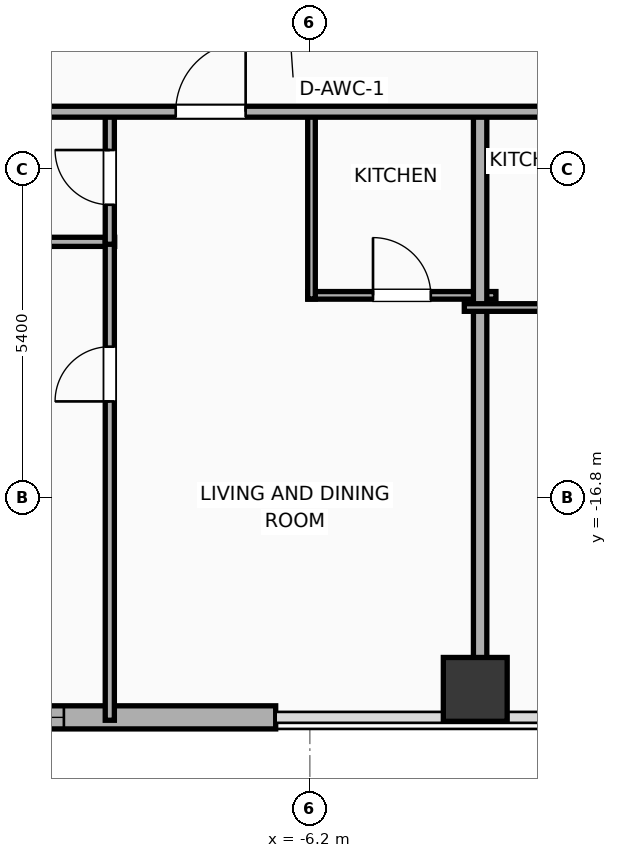
"""IFC4 building model, lengths in metres.
Left out: names, types, materials, properties, quantities, classifications, styles, units other than length and angle.
Written with IfcOpenShell. Run it as: python <this file> out.ifc"""

import sys

from ifc_helpers import new_model, si_unit, direction, frame, frame_2d, origin, origin_2d, place, context, subcontext, project, spatial, rectangle, hollow_rectangle, extrude, element, fill, save


model = new_model("IFC4")
c1 = context("Model", 3, precision=1e-05, world=origin(), true_north=direction((0.0, 1.0)))
c2 = subcontext(c1, "Body", "Model", "MODEL_VIEW")
j1 = project(units=[si_unit("LENGTHUNIT", "METRE"), si_unit("PLANEANGLEUNIT", "RADIAN")], contexts=[c1])
p1 = place(None, origin())
s1 = spatial("IfcSite", under=j1, at=p1, CompositionType="ELEMENT")
p2 = place(p1, origin())
s2 = spatial("IfcBuilding", under=s1, at=p2, CompositionType="ELEMENT")
p3 = place(p2, frame((0.0, 0.0, 117.0)))
s3 = spatial("IfcBuildingStorey", under=s2, at=p3, CompositionType="ELEMENT", Elevation=117.0)
p4 = place(p3, frame((-3.48, -19.95, 0.0), z_axis=(0.0, 0.0, 1.0), x_axis=(1.0, 0.0, 0.0)))
e1 = element("IfcColumn", 1, at=p4, inside=s3, PredefinedType="COLUMN", context=c2, shape_type="SweptSolid", body=[
    extrude(hollow_rectangle(XDim=1.05, YDim=1.05, WallThickness=0.036, at=origin_2d()), origin(), (0.0, 0.0, 1.0), 3.9),
])
p5 = place(p3, frame((-6.762, -20.41, 0.0), z_axis=(0.0, 0.0, 1.0), x_axis=(-1.0, 0.0, 0.0)))
e2 = element("IfcWall", 2, at=p5, inside=s3, PredefinedType="ELEMENTEDWALL", context=c2, shape_type="SweptSolid", body=[
    extrude(rectangle(XDim=18.619, YDim=0.38, at=frame_2d((9.31, 0.0))), origin(), (0.0, 0.0, 1.0), 3.65),
])
p6 = place(p5, frame((9.76, 0.0, 0.75)))
e3 = element("IfcOpeningElement", 3, at=p6, cuts=e2, PredefinedType="OPENING", context=c2, shape_type="SweptSolid", body=[
    extrude(rectangle(XDim=2.4, YDim=2.1, at=frame_2d((1.2, 1.05))), frame((0.0, 0.2, 0.0), z_axis=(0.0, -1.0, 0.0), x_axis=(1.0, 0.0, 0.0)), (0.0, 0.0, 1.0), 0.4),
])
p7 = place(p5, frame((15.384, 0.0, 0.75)))
e4 = element("IfcOpeningElement", 4, at=p7, cuts=e2, PredefinedType="OPENING", context=c2, shape_type="SweptSolid", body=[
    extrude(rectangle(XDim=1.2, YDim=2.05, at=frame_2d((0.6, 1.025))), frame((0.0, 0.2, 0.0), z_axis=(0.0, -1.0, 0.0), x_axis=(1.0, 0.0, 0.0)), (0.0, 0.0, 1.0), 0.4),
])
p8 = place(p5, frame((5.703, 0.0, 0.75)))
e5 = element("IfcOpeningElement", 5, at=p8, cuts=e2, PredefinedType="OPENING", context=c2, shape_type="SweptSolid", body=[
    extrude(rectangle(XDim=1.2, YDim=2.05, at=frame_2d((0.6, 1.025))), frame((0.0, 0.2, 0.0), z_axis=(0.0, -1.0, 0.0), x_axis=(1.0, 0.0, 0.0)), (0.0, 0.0, 1.0), 0.4),
])
p9 = place(p5, frame((3.483, 0.0, 0.75)))
e6 = element("IfcOpeningElement", 6, at=p9, cuts=e2, PredefinedType="OPENING", context=c2, shape_type="SweptSolid", body=[
    extrude(rectangle(XDim=1.2, YDim=2.05, at=frame_2d((0.6, 1.025))), frame((0.0, 0.2, 0.0), z_axis=(0.0, -1.0, 0.0), x_axis=(1.0, 0.0, 0.0)), (0.0, 0.0, 1.0), 0.4),
])
p10 = place(p3, frame((-12.46, -12.59, 0.0), z_axis=(0.0, 0.0, 1.0), x_axis=(1.0, 0.0, 0.0)))
e7 = element("IfcWall", 7, at=p10, inside=s3, PredefinedType="PLUMBINGWALL", context=c2, shape_type="SweptSolid", body=[
    extrude(rectangle(XDim=3.05, YDim=0.15, at=frame_2d((1.525, 0.0))), origin(), (0.0, 0.0, 1.0), 3.65),
])
p11 = place(p3, frame((-9.49, -20.458, 0.0), z_axis=(0.0, 0.0, 1.0), x_axis=(0.0, 1.0, 0.0)))
e8 = element("IfcWall", 8, at=p11, inside=s3, PredefinedType="PLUMBINGWALL", context=c2, shape_type="SweptSolid", body=[
    extrude(rectangle(XDim=7.907, YDim=0.15, at=frame_2d((3.954, 0.0))), origin(), (0.0, 0.0, 1.0), 3.65),
])
p12 = place(p11, frame((5.243, 0.0, 0.0)))
e9 = element("IfcOpeningElement", 9, at=p12, cuts=e8, PredefinedType="OPENING", context=c2, shape_type="SweptSolid", body=[
    extrude(rectangle(XDim=0.9, YDim=2.05, at=frame_2d((0.45, 1.025))), frame((0.0, 0.085, 0.0), z_axis=(0.0, -1.0, 0.0), x_axis=(1.0, 0.0, 0.0)), (0.0, 0.0, 1.0), 0.17),
])
p13 = place(p3, frame((-9.49, -12.63, 0.0), z_axis=(0.0, 0.0, 1.0), x_axis=(0.0, 1.0, 0.0)))
e10 = element("IfcWall", 10, at=p13, inside=s3, PredefinedType="PLUMBINGWALL", context=c2, shape_type="SweptSolid", body=[
    extrude(rectangle(XDim=2.2, YDim=0.15, at=frame_2d((1.1, 0.0))), origin(), (0.0, 0.0, 1.0), 3.65),
])
p14 = place(p13, frame((0.65, 0.0, 0.0)))
e11 = element("IfcOpeningElement", 11, at=p14, cuts=e10, PredefinedType="OPENING", context=c2, shape_type="SweptSolid", body=[
    extrude(rectangle(XDim=0.9, YDim=2.05, at=frame_2d((0.45, 1.025))), frame((0.0, 0.085, 0.0), z_axis=(0.0, -1.0, 0.0), x_axis=(1.0, 0.0, 0.0)), (0.0, 0.0, 1.0), 0.17),
])
p15 = place(p3, frame((-6.233, -13.47, 0.0), z_axis=(0.0, 0.0, 1.0), x_axis=(1.0, 0.0, 0.0)))
e12 = element("IfcWall", 12, at=p15, inside=s3, PredefinedType="PARTITIONING", context=c2, shape_type="SweptSolid", body=[
    extrude(rectangle(XDim=3.093, YDim=0.125, at=frame_2d((1.546, 0.0))), origin(), (0.0, 0.0, 1.0), 3.65),
])
p16 = place(p15, frame((1.072, 0.0, 0.0)))
e13 = element("IfcOpeningElement", 13, at=p16, cuts=e12, PredefinedType="OPENING", context=c2, shape_type="SweptSolid", body=[
    extrude(rectangle(XDim=0.95, YDim=2.05, at=frame_2d((0.475, 1.025))), frame((0.0, 0.073, 0.0), z_axis=(0.0, -1.0, 0.0), x_axis=(1.0, 0.0, 0.0)), (0.0, 0.0, 1.0), 0.145),
])
p17 = place(p3, frame((-6.173, -13.53, 0.0), z_axis=(0.0, 0.0, 1.0), x_axis=(0.0, 1.0, 0.0)))
e14 = element("IfcWall", 14, at=p17, inside=s3, PredefinedType="PARTITIONING", context=c2, shape_type="SweptSolid", body=[
    extrude(rectangle(XDim=3.1, YDim=0.125, at=frame_2d((1.55, 0.0))), origin(), (0.0, 0.0, 1.0), 3.65),
])
p18 = place(p3, frame((-3.4, -20.41, 0.0), z_axis=(0.0, 0.0, 1.0), x_axis=(0.0, 1.0, 0.0)))
e15 = element("IfcWall", 15, at=p18, inside=s3, PredefinedType="PARTITIONING", context=c2, shape_type="SweptSolid", body=[
    extrude(rectangle(XDim=10.04, YDim=0.22, at=frame_2d((5.02, 0.0))), origin(), (0.0, 0.0, 1.0), 3.04),
])
p19 = place(p3, frame((-3.66, -13.67, 0.0), z_axis=(0.0, 0.0, 1.0), x_axis=(1.0, 0.0, 0.0)))
e16 = element("IfcWall", 16, at=p19, inside=s3, PredefinedType="PARTITIONING", context=c2, shape_type="SweptSolid", body=[
    extrude(rectangle(XDim=2.784, YDim=0.125, at=frame_2d((1.392, 0.0))), origin(), (0.0, 0.0, 1.0), 3.65),
])
p20 = place(p3, frame((-29.21, -10.45, 0.0), z_axis=(0.0, 0.0, 1.0), x_axis=(1.0, 0.0, 0.0)))
e17 = element("IfcWall", 17, at=p20, inside=s3, PredefinedType="PARTITIONING", context=c2, shape_type="SweptSolid", body=[
    extrude(rectangle(XDim=62.42, YDim=0.18, at=frame_2d((31.21, 0.0))), origin(), (0.0, 0.0, 1.0), 3.65),
])
p21 = place(p20, frame((3.813, 0.0, 0.0)))
e18 = element("IfcOpeningElement", 18, at=p21, cuts=e17, PredefinedType="OPENING", context=c2, shape_type="SweptSolid", body=[
    extrude(rectangle(XDim=1.15, YDim=2.05, at=frame_2d((0.575, 1.025))), frame((0.0, 0.1, 0.0), z_axis=(0.0, -1.0, 0.0), x_axis=(1.0, 0.0, 0.0)), (0.0, 0.0, 1.0), 0.2),
])
p22 = place(p20, frame((12.271, 0.0, 0.0)))
e19 = element("IfcOpeningElement", 19, at=p22, cuts=e17, PredefinedType="OPENING", context=c2, shape_type="SweptSolid", body=[
    extrude(rectangle(XDim=1.15, YDim=2.05, at=frame_2d((0.575, 1.025))), frame((0.0, 0.1, 0.0), z_axis=(0.0, -1.0, 0.0), x_axis=(1.0, 0.0, 0.0)), (0.0, 0.0, 1.0), 0.2),
])
p23 = place(p20, frame((20.804, 0.0, 0.0)))
e20 = element("IfcOpeningElement", 20, at=p23, cuts=e17, PredefinedType="OPENING", context=c2, shape_type="SweptSolid", body=[
    extrude(rectangle(XDim=1.15, YDim=2.05, at=frame_2d((0.575, 1.025))), frame((0.0, 0.1, 0.0), z_axis=(0.0, -1.0, 0.0), x_axis=(1.0, 0.0, 0.0)), (0.0, 0.0, 1.0), 0.2),
])
p24 = place(p20, frame((29.848, 0.0, 0.0)))
e21 = element("IfcOpeningElement", 21, at=p24, cuts=e17, PredefinedType="OPENING", context=c2, shape_type="SweptSolid", body=[
    extrude(rectangle(XDim=1.15, YDim=2.05, at=frame_2d((0.575, 1.025))), frame((0.0, 0.1, 0.0), z_axis=(0.0, -1.0, 0.0), x_axis=(1.0, 0.0, 0.0)), (0.0, 0.0, 1.0), 0.2),
])
p25 = place(p20, frame((38.45, 0.0, 0.0)))
e22 = element("IfcOpeningElement", 22, at=p25, cuts=e17, PredefinedType="OPENING", context=c2, shape_type="SweptSolid", body=[
    extrude(rectangle(XDim=1.15, YDim=2.05, at=frame_2d((0.575, 1.025))), frame((0.0, 0.1, 0.0), z_axis=(0.0, -1.0, 0.0), x_axis=(1.0, 0.0, 0.0)), (0.0, 0.0, 1.0), 0.2),
])
p26 = place(p20, frame((47.42, 0.0, 0.0)))
e23 = element("IfcOpeningElement", 23, at=p26, cuts=e17, PredefinedType="OPENING", context=c2, shape_type="SweptSolid", body=[
    extrude(rectangle(XDim=1.15, YDim=2.05, at=frame_2d((0.575, 1.025))), frame((0.0, 0.1, 0.0), z_axis=(0.0, -1.0, 0.0), x_axis=(1.0, 0.0, 0.0)), (0.0, 0.0, 1.0), 0.2),
])
p27 = place(p20, frame((56.92, 0.0, 0.0)))
e24 = element("IfcOpeningElement", 24, at=p27, cuts=e17, PredefinedType="OPENING", context=c2, shape_type="SweptSolid", body=[
    extrude(rectangle(XDim=1.15, YDim=2.05, at=frame_2d((0.575, 1.025))), frame((0.0, 0.1, 0.0), z_axis=(0.0, -1.0, 0.0), x_axis=(1.0, 0.0, 0.0)), (0.0, 0.0, 1.0), 0.2),
])
p28 = place(p9, origin())
e25 = element("IfcWindow", 25, at=p28, inside=s3, PartitioningType="SINGLE_PANEL", PredefinedType="WINDOW", context=c2, shape_type="SweptSolid", body=[
    extrude(rectangle(XDim=1.2, YDim=2.05, at=frame_2d((0.6, 1.025))), frame((0.0, 0.03, 0.0), z_axis=(0.0, -1.0, 0.0), x_axis=(1.0, 0.0, 0.0)), (0.0, 0.0, 1.0), 0.06),
])
fill(e6, e25)
p29 = place(p12, origin())
e26 = element("IfcDoor", 26, at=p29, inside=s3, OperationType="SINGLE_SWING_LEFT", PredefinedType="DOOR", context=c2, shape_type="SweptSolid", body=[
    extrude(rectangle(XDim=0.9, YDim=2.05, at=frame_2d((0.45, 1.025))), frame((0.0, 0.025, 0.0), z_axis=(0.0, -1.0, 0.0), x_axis=(1.0, 0.0, 0.0)), (0.0, 0.0, 1.0), 0.05),
])
fill(e9, e26)
p30 = place(p14, origin())
e27 = element("IfcDoor", 27, at=p30, inside=s3, OperationType="SINGLE_SWING_RIGHT", PredefinedType="DOOR", context=c2, shape_type="SweptSolid", body=[
    extrude(rectangle(XDim=0.9, YDim=2.05, at=frame_2d((0.45, 1.025))), frame((0.0, 0.025, 0.0), z_axis=(0.0, -1.0, 0.0), x_axis=(1.0, 0.0, 0.0)), (0.0, 0.0, 1.0), 0.05),
])
fill(e11, e27)
p31 = place(p16, origin())
e28 = element("IfcDoor", 28, at=p31, inside=s3, OperationType="SINGLE_SWING_LEFT", PredefinedType="DOOR", context=c2, shape_type="SweptSolid", body=[
    extrude(rectangle(XDim=0.95, YDim=2.05, at=frame_2d((0.475, 1.025))), frame((0.0, 0.025, 0.0), z_axis=(0.0, -1.0, 0.0), x_axis=(1.0, 0.0, 0.0)), (0.0, 0.0, 1.0), 0.05),
])
fill(e13, e28)
p32 = place(p23, origin())
e29 = element("IfcDoor", 29, at=p32, inside=s3, OperationType="SINGLE_SWING_RIGHT", PredefinedType="DOOR", context=c2, shape_type="SweptSolid", body=[
    extrude(rectangle(XDim=1.15, YDim=2.05, at=frame_2d((0.575, 1.025))), frame((0.0, 0.025, 0.0), z_axis=(0.0, -1.0, 0.0), x_axis=(1.0, 0.0, 0.0)), (0.0, 0.0, 1.0), 0.05),
])
fill(e20, e29)
save(model, sys.argv[1])
